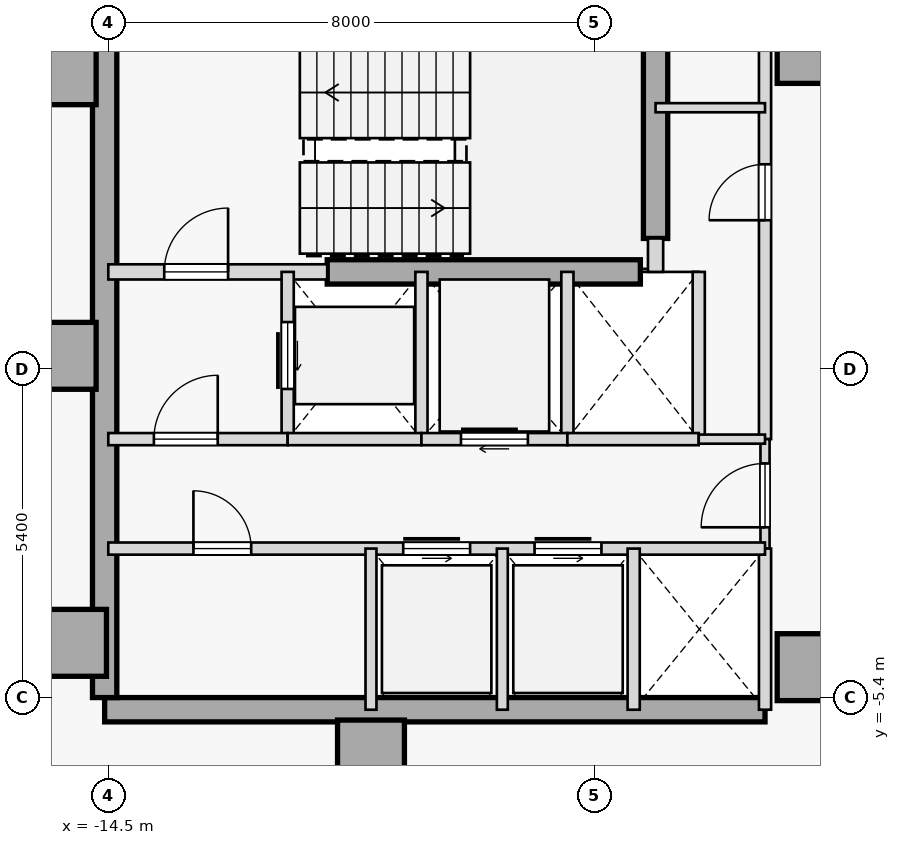
"""IFC4 building model, lengths in metres.
Left out: names, types, materials, properties, quantities, classifications, styles, units other than length and angle.
Written with IfcOpenShell. Run it as: python <this file> out.ifc"""

import sys

from ifc_helpers import new_model, si_unit, direction, frame, frame_2d, origin, origin_2d, place, context, subcontext, project, spatial, rectangle, extrude, element, fill, save


model = new_model("IFC4")
c1 = context("Model", 3, precision=1e-05, world=origin(), true_north=direction((0.0, 1.0)))
c2 = subcontext(c1, "Body", "Model", "MODEL_VIEW")
j1 = project(units=[si_unit("LENGTHUNIT", "METRE"), si_unit("PLANEANGLEUNIT", "RADIAN")], contexts=[c1])
p1 = place(None, origin())
s1 = spatial("IfcSite", under=j1, at=p1, CompositionType="ELEMENT")
p2 = place(p1, origin())
s2 = spatial("IfcBuilding", under=s1, at=p2, CompositionType="ELEMENT")
p3 = place(p2, frame((0.0, 0.0, 105.9)))
s3 = spatial("IfcBuildingStorey", under=s2, at=p3, CompositionType="ELEMENT", Elevation=105.9)
for number, where, z_axis, x_axis in (
    (1, (-15.25, 4.9, 0.0), (0.0, 0.0, 1.0), (1.0, 0.0, 0.0)),
    (2, (-15.25, 0.22, 0.0), (0.0, 0.0, 1.0), (1.0, 0.0, 0.0)),
    (3, (-15.08, -4.5, 0.0), (0.0, 0.0, 1.0), (1.0, 0.0, 0.0)),
    (4, (-10.18, -6.32, 0.0), (0.0, 0.0, 1.0), (1.0, 0.0, 0.0)),
    (5, (-2.95, -4.9, 0.0), (0.0, 0.0, 1.0), (1.0, 0.0, 0.0)),
    (6, (-2.95, 5.25, 0.0), (0.0, 0.0, 1.0), (1.0, 0.0, 0.0)),
):
    element("IfcColumn", number, at=place(p3, frame(where, z_axis=z_axis, x_axis=x_axis)), inside=s3, PredefinedType="COLUMN", context=c2, shape_type="SweptSolid", body=[
        extrude(rectangle(XDim=1.1, YDim=1.1, at=origin_2d()), origin(), (0.0, 0.0, 1.0), 3.7),
    ])
p4 = place(p3, frame((-14.56, -5.6, 0.0), z_axis=(0.0, 0.0, 1.0), x_axis=(1.0, 0.0, 0.0)))
e7 = element("IfcWall", 7, at=p4, inside=s3, PredefinedType="SHEAR", context=c2, shape_type="SweptSolid", body=[
    extrude(rectangle(XDim=10.86, YDim=0.4, at=frame_2d((5.43, 0.0))), origin(), (0.0, 0.0, 1.0), 3.475),
])
p5 = place(p3, frame((-14.56, -5.4, 0.0), z_axis=(0.0, 0.0, 1.0), x_axis=(0.0, 1.0, 0.0)))
e8 = element("IfcWall", 8, at=p5, inside=s3, PredefinedType="SHEAR", context=c2, shape_type="SweptSolid", body=[
    extrude(rectangle(XDim=10.8, YDim=0.4, at=frame_2d((5.4, 0.0))), origin(), (0.0, 0.0, 1.0), 3.475),
])
p6 = place(p3, frame((-5.5, 2.15, 0.0), z_axis=(0.0, 0.0, 1.0), x_axis=(0.0, 1.0, 0.0)))
e9 = element("IfcWall", 9, at=p6, inside=s3, PredefinedType="SHEAR", context=c2, shape_type="SweptSolid", body=[
    extrude(rectangle(XDim=3.25, YDim=0.4, at=frame_2d((1.625, 0.0))), origin(), (0.0, 0.0, 1.0), 3.475),
])
p7 = place(p3, frame((-10.9, 1.6, 0.0), z_axis=(0.0, 0.0, 1.0), x_axis=(1.0, 0.0, 0.0)))
e10 = element("IfcWall", 10, at=p7, inside=s3, PredefinedType="SHEAR", context=c2, shape_type="SweptSolid", body=[
    extrude(rectangle(XDim=5.15, YDim=0.4, at=frame_2d((2.575, 0.0))), origin(), (0.0, 0.0, 1.0), 3.475),
])
p8 = place(p3, frame((-14.5, 1.6, 0.0), z_axis=(0.0, 0.0, 1.0), x_axis=(1.0, 0.0, 0.0)))
e11 = element("IfcWall", 11, at=p8, inside=s3, PredefinedType="STANDARD", context=c2, shape_type="SweptSolid", body=[
    extrude(rectangle(XDim=3.6, YDim=0.25, at=frame_2d((1.8, 0.0))), origin(), (0.0, 0.0, 1.0), 3.475),
])
p9 = place(p8, frame((0.92, 0.0, 0.0)))
e12 = element("IfcOpeningElement", 12, at=p9, cuts=e11, PredefinedType="OPENING", context=c2, shape_type="SweptSolid", body=[
    extrude(rectangle(XDim=1.05, YDim=2.15, at=frame_2d((0.525, 1.075))), frame((0.0, 0.135, 0.0), z_axis=(0.0, -1.0, 0.0), x_axis=(1.0, 0.0, 0.0)), (0.0, 0.0, 1.0), 0.27),
])
p10 = place(p3, frame((-5.5, 1.6, 0.0), z_axis=(0.0, 0.0, 1.0), x_axis=(0.0, 1.0, 0.0)))
e13 = element("IfcWall", 13, at=p10, inside=s3, PredefinedType="STANDARD", context=c2, shape_type="SweptSolid", body=[
    extrude(rectangle(XDim=0.55, YDim=0.25, at=frame_2d((0.275, 0.0))), origin(), (0.0, 0.0, 1.0), 3.475),
])
p11 = place(p3, frame((-3.7, -1.15, 0.0), z_axis=(0.0, 0.0, 1.0), x_axis=(0.0, 1.0, 0.0)))
e14 = element("IfcWall", 14, at=p11, inside=s3, PredefinedType="STANDARD", context=c2, shape_type="SweptSolid", body=[
    extrude(rectangle(XDim=6.75, YDim=0.2, at=frame_2d((3.375, 0.0))), origin(), (0.0, 0.0, 1.0), 3.475),
])
p12 = place(p11, frame((3.6, 0.0, 0.0)))
e15 = element("IfcOpeningElement", 15, at=p12, cuts=e14, PredefinedType="OPENING", context=c2, shape_type="SweptSolid", body=[
    extrude(rectangle(XDim=0.92, YDim=2.15, at=frame_2d((0.46, 1.075))), frame((0.0, 0.11, 0.0), z_axis=(0.0, -1.0, 0.0), x_axis=(1.0, 0.0, 0.0)), (0.0, 0.0, 1.0), 0.22),
])
p13 = place(p3, frame((-3.7, -2.95, 0.0), z_axis=(0.0, 0.0, 1.0), x_axis=(0.0, 1.0, 0.0)))
e16 = element("IfcWall", 16, at=p13, inside=s3, PredefinedType="PARTITIONING", context=c2, shape_type="SweptSolid", body=[
    extrude(rectangle(XDim=1.8, YDim=0.15, at=frame_2d((0.9, 0.0))), origin(), (0.0, 0.0, 1.0), 3.475),
])
p14 = place(p13, frame((0.35, 0.0, 0.0)))
e17 = element("IfcOpeningElement", 17, at=p14, cuts=e16, PredefinedType="OPENING", context=c2, shape_type="SweptSolid", body=[
    extrude(rectangle(XDim=1.05, YDim=2.18, at=frame_2d((0.525, 1.09))), frame((0.0, 0.085, 0.0), z_axis=(0.0, -1.0, 0.0), x_axis=(1.0, 0.0, 0.0)), (0.0, 0.0, 1.0), 0.17),
])
p15 = place(p3, frame((-3.7, -5.6, 0.0), z_axis=(0.0, 0.0, 1.0), x_axis=(0.0, 1.0, 0.0)))
e18 = element("IfcWall", 18, at=p15, inside=s3, PredefinedType="STANDARD", context=c2, shape_type="SweptSolid", body=[
    extrude(rectangle(XDim=2.65, YDim=0.2, at=frame_2d((1.325, 0.0))), origin(), (0.0, 0.0, 1.0), 3.475),
])
p16 = place(p3, frame((-11.55, -1.15, 0.0), z_axis=(0.0, 0.0, 1.0), x_axis=(0.0, 1.0, 0.0)))
e19 = element("IfcWall", 19, at=p16, inside=s3, PredefinedType="STANDARD", context=c2, shape_type="SweptSolid", body=[
    extrude(rectangle(XDim=2.75, YDim=0.2, at=frame_2d((1.375, 0.0))), origin(), (0.0, 0.0, 1.0), 3.475),
])
p17 = place(p16, frame((0.825, 0.0, 0.0)))
e20 = element("IfcOpeningElement", 20, at=p17, cuts=e19, PredefinedType="OPENING", context=c2, shape_type="SweptSolid", body=[
    extrude(rectangle(XDim=1.1, YDim=2.15, at=frame_2d((0.55, 1.075))), frame((0.0, 0.11, 0.0), z_axis=(0.0, -1.0, 0.0), x_axis=(1.0, 0.0, 0.0)), (0.0, 0.0, 1.0), 0.22),
])
p18 = place(p3, frame((-9.35, -1.15, 0.0), z_axis=(0.0, 0.0, 1.0), x_axis=(0.0, 1.0, 0.0)))
e21 = element("IfcWall", 21, at=p18, inside=s3, PredefinedType="STANDARD", context=c2, shape_type="SweptSolid", body=[
    extrude(rectangle(XDim=2.75, YDim=0.2, at=frame_2d((1.375, 0.0))), origin(), (0.0, 0.0, 1.0), 3.475),
])
p19 = place(p3, frame((-14.5, -1.15, 0.0), z_axis=(0.0, 0.0, 1.0), x_axis=(1.0, 0.0, 0.0)))
e22 = element("IfcWall", 22, at=p19, inside=s3, PredefinedType="STANDARD", context=c2, shape_type="SweptSolid", body=[
    extrude(rectangle(XDim=2.95, YDim=0.2, at=frame_2d((1.475, 0.0))), origin(), (0.0, 0.0, 1.0), 3.475),
])
p20 = place(p19, frame((0.75, 0.0, 0.0)))
e23 = element("IfcOpeningElement", 23, at=p20, cuts=e22, PredefinedType="OPENING", context=c2, shape_type="SweptSolid", body=[
    extrude(rectangle(XDim=1.05, YDim=2.18, at=frame_2d((0.525, 1.09))), frame((0.0, 0.11, 0.0), z_axis=(0.0, -1.0, 0.0), x_axis=(1.0, 0.0, 0.0)), (0.0, 0.0, 1.0), 0.22),
])
p21 = place(p3, frame((-11.55, -1.15, 0.0), z_axis=(0.0, 0.0, 1.0), x_axis=(1.0, 0.0, 0.0)))
e24 = element("IfcWall", 24, at=p21, inside=s3, PredefinedType="STANDARD", context=c2, shape_type="SweptSolid", body=[
    extrude(rectangle(XDim=2.2, YDim=0.2, at=frame_2d((1.1, 0.0))), origin(), (0.0, 0.0, 1.0), 3.475),
])
p22 = place(p3, frame((-6.95, -1.15, 0.0), z_axis=(0.0, 0.0, 1.0), x_axis=(0.0, 1.0, 0.0)))
e25 = element("IfcWall", 25, at=p22, inside=s3, PredefinedType="STANDARD", context=c2, shape_type="SweptSolid", body=[
    extrude(rectangle(XDim=2.75, YDim=0.2, at=frame_2d((1.375, 0.0))), origin(), (0.0, 0.0, 1.0), 3.475),
])
p23 = place(p3, frame((-9.35, -1.15, 0.0), z_axis=(0.0, 0.0, 1.0), x_axis=(1.0, 0.0, 0.0)))
e26 = element("IfcWall", 26, at=p23, inside=s3, PredefinedType="STANDARD", context=c2, shape_type="SweptSolid", body=[
    extrude(rectangle(XDim=2.4, YDim=0.2, at=frame_2d((1.2, 0.0))), origin(), (0.0, 0.0, 1.0), 3.475),
])
p24 = place(p23, frame((0.65, 0.0, 0.0)))
e27 = element("IfcOpeningElement", 27, at=p24, cuts=e26, PredefinedType="OPENING", context=c2, shape_type="SweptSolid", body=[
    extrude(rectangle(XDim=1.1, YDim=2.15, at=frame_2d((0.55, 1.075))), frame((0.0, 0.11, 0.0), z_axis=(0.0, -1.0, 0.0), x_axis=(1.0, 0.0, 0.0)), (0.0, 0.0, 1.0), 0.22),
])
p25 = place(p3, frame((-4.79, -1.15, 0.0), z_axis=(0.0, 0.0, 1.0), x_axis=(0.0, 1.0, 0.0)))
e28 = element("IfcWall", 28, at=p25, inside=s3, PredefinedType="STANDARD", context=c2, shape_type="SweptSolid", body=[
    extrude(rectangle(XDim=2.75, YDim=0.2, at=frame_2d((1.375, 0.0))), origin(), (0.0, 0.0, 1.0), 3.475),
])
p26 = place(p3, frame((-6.95, -1.15, 0.0), z_axis=(0.0, 0.0, 1.0), x_axis=(1.0, 0.0, 0.0)))
e29 = element("IfcWall", 29, at=p26, inside=s3, PredefinedType="STANDARD", context=c2, shape_type="SweptSolid", body=[
    extrude(rectangle(XDim=2.16, YDim=0.2, at=frame_2d((1.08, 0.0))), origin(), (0.0, 0.0, 1.0), 3.475),
])
p27 = place(p3, frame((-4.79, -1.15, 0.0), z_axis=(0.0, 0.0, 1.0), x_axis=(1.0, 0.0, 0.0)))
e30 = element("IfcWall", 30, at=p27, inside=s3, PredefinedType="PARTITIONING", context=c2, shape_type="SweptSolid", body=[
    extrude(rectangle(XDim=1.09, YDim=0.15, at=frame_2d((0.545, 0.0))), origin(), (0.0, 0.0, 1.0), 3.475),
])
p28 = place(p3, frame((-14.5, -2.95, 0.0), z_axis=(0.0, 0.0, 1.0), x_axis=(1.0, 0.0, 0.0)))
e31 = element("IfcWall", 31, at=p28, inside=s3, PredefinedType="STANDARD", context=c2, shape_type="SweptSolid", body=[
    extrude(rectangle(XDim=10.8, YDim=0.2, at=frame_2d((5.4, 0.0))), origin(), (0.0, 0.0, 1.0), 3.475),
])
p29 = place(p28, frame((4.85, 0.0, 0.0)))
e32 = element("IfcOpeningElement", 32, at=p29, cuts=e31, PredefinedType="OPENING", context=c2, shape_type="SweptSolid", body=[
    extrude(rectangle(XDim=1.1, YDim=2.15, at=frame_2d((0.55, 1.075))), frame((0.0, 0.11, 0.0), z_axis=(0.0, -1.0, 0.0), x_axis=(1.0, 0.0, 0.0)), (0.0, 0.0, 1.0), 0.22),
])
p30 = place(p28, frame((7.01, 0.0, 0.0)))
e33 = element("IfcOpeningElement", 33, at=p30, cuts=e31, PredefinedType="OPENING", context=c2, shape_type="SweptSolid", body=[
    extrude(rectangle(XDim=1.1, YDim=2.15, at=frame_2d((0.55, 1.075))), frame((0.0, 0.11, 0.0), z_axis=(0.0, -1.0, 0.0), x_axis=(1.0, 0.0, 0.0)), (0.0, 0.0, 1.0), 0.22),
])
p31 = place(p28, frame((1.4, 0.0, 0.0)))
e34 = element("IfcOpeningElement", 34, at=p31, cuts=e31, PredefinedType="OPENING", context=c2, shape_type="SweptSolid", body=[
    extrude(rectangle(XDim=0.95, YDim=2.15, at=frame_2d((0.475, 1.075))), frame((0.0, 0.11, 0.0), z_axis=(0.0, -1.0, 0.0), x_axis=(1.0, 0.0, 0.0)), (0.0, 0.0, 1.0), 0.22),
])
p32 = place(p3, frame((-5.86, -5.6, 0.0), z_axis=(0.0, 0.0, 1.0), x_axis=(0.0, 1.0, 0.0)))
e35 = element("IfcWall", 35, at=p32, inside=s3, PredefinedType="STANDARD", context=c2, shape_type="SweptSolid", body=[
    extrude(rectangle(XDim=2.65, YDim=0.2, at=frame_2d((1.325, 0.0))), origin(), (0.0, 0.0, 1.0), 3.475),
])
for number, where, z_axis, x_axis in (
    (36, (-10.18, -5.6, 0.0), (0.0, 0.0, 1.0), (0.0, 1.0, 0.0)),
    (37, (-8.02, -5.6, 0.0), (0.0, 0.0, 1.0), (0.0, 1.0, 0.0)),
):
    element("IfcWall", number, at=place(p3, frame(where, z_axis=z_axis, x_axis=x_axis)), inside=s3, PredefinedType="STANDARD", context=c2, shape_type="SweptSolid", body=[
        extrude(rectangle(XDim=2.65, YDim=0.18, at=frame_2d((1.325, 0.0))), origin(), (0.0, 0.0, 1.0), 3.475),
    ])
p33 = place(p3, frame((-5.5, 4.3, 0.0), z_axis=(0.0, 0.0, 1.0), x_axis=(1.0, 0.0, 0.0)))
e38 = element("IfcWall", 38, at=p33, inside=s3, PredefinedType="PARTITIONING", context=c2, shape_type="SweptSolid", body=[
    extrude(rectangle(XDim=1.8, YDim=0.15, at=frame_2d((0.9, 0.0))), origin(), (0.0, 0.0, 1.0), 3.475),
])
p34 = place(p9, origin())
e39 = element("IfcDoor", 39, at=p34, inside=s3, OperationType="SINGLE_SWING_RIGHT", PredefinedType="DOOR", context=c2, shape_type="SweptSolid", body=[
    extrude(rectangle(XDim=1.05, YDim=2.15, at=frame_2d((0.525, 1.075))), frame((0.0, 0.025, 0.0), z_axis=(0.0, -1.0, 0.0), x_axis=(1.0, 0.0, 0.0)), (0.0, 0.0, 1.0), 0.05),
])
fill(e12, e39)
p35 = place(p20, origin())
e40 = element("IfcDoor", 40, at=p35, inside=s3, OperationType="SINGLE_SWING_RIGHT", PredefinedType="DOOR", context=c2, shape_type="SweptSolid", body=[
    extrude(rectangle(XDim=1.05, YDim=2.18, at=frame_2d((0.525, 1.09))), frame((0.0, 0.025, 0.0), z_axis=(0.0, -1.0, 0.0), x_axis=(1.0, 0.0, 0.0)), (0.0, 0.0, 1.0), 0.05),
])
fill(e23, e40)
p36 = place(p14, origin())
e41 = element("IfcDoor", 41, at=p36, inside=s3, OperationType="SINGLE_SWING_LEFT", PredefinedType="DOOR", context=c2, shape_type="SweptSolid", body=[
    extrude(rectangle(XDim=1.05, YDim=2.18, at=frame_2d((0.525, 1.09))), frame((0.0, 0.025, 0.0), z_axis=(0.0, -1.0, 0.0), x_axis=(1.0, 0.0, 0.0)), (0.0, 0.0, 1.0), 0.05),
])
fill(e17, e41)
p37 = place(p17, origin())
e42 = element("IfcDoor", 42, at=p37, inside=s3, OperationType="SLIDING_TO_RIGHT", PredefinedType="DOOR", context=c2, shape_type="SweptSolid", body=[
    extrude(rectangle(XDim=1.1, YDim=2.15, at=frame_2d((0.55, 1.075))), frame((0.0, 0.025, 0.0), z_axis=(0.0, -1.0, 0.0), x_axis=(1.0, 0.0, 0.0)), (0.0, 0.0, 1.0), 0.05),
])
fill(e20, e42)
p38 = place(p24, origin())
e43 = element("IfcDoor", 43, at=p38, inside=s3, OperationType="SLIDING_TO_RIGHT", PredefinedType="DOOR", context=c2, shape_type="SweptSolid", body=[
    extrude(rectangle(XDim=1.1, YDim=2.15, at=frame_2d((0.55, 1.075))), frame((0.0, 0.025, 0.0), z_axis=(0.0, -1.0, 0.0), x_axis=(1.0, 0.0, 0.0)), (0.0, 0.0, 1.0), 0.05),
])
fill(e27, e43)
p39 = place(p29, origin())
e44 = element("IfcDoor", 44, at=p39, inside=s3, OperationType="SLIDING_TO_LEFT", PredefinedType="DOOR", context=c2, shape_type="SweptSolid", body=[
    extrude(rectangle(XDim=1.1, YDim=2.15, at=frame_2d((0.55, 1.075))), frame((0.0, 0.025, 0.0), z_axis=(0.0, -1.0, 0.0), x_axis=(1.0, 0.0, 0.0)), (0.0, 0.0, 1.0), 0.05),
])
fill(e32, e44)
p40 = place(p30, origin())
e45 = element("IfcDoor", 45, at=p40, inside=s3, OperationType="SLIDING_TO_LEFT", PredefinedType="DOOR", context=c2, shape_type="SweptSolid", body=[
    extrude(rectangle(XDim=1.1, YDim=2.15, at=frame_2d((0.55, 1.075))), frame((0.0, 0.025, 0.0), z_axis=(0.0, -1.0, 0.0), x_axis=(1.0, 0.0, 0.0)), (0.0, 0.0, 1.0), 0.05),
])
fill(e33, e45)
p41 = place(p31, origin())
e46 = element("IfcDoor", 46, at=p41, inside=s3, OperationType="SINGLE_SWING_LEFT", PredefinedType="DOOR", context=c2, shape_type="SweptSolid", body=[
    extrude(rectangle(XDim=0.95, YDim=2.15, at=frame_2d((0.475, 1.075))), frame((0.0, 0.025, 0.0), z_axis=(0.0, -1.0, 0.0), x_axis=(1.0, 0.0, 0.0)), (0.0, 0.0, 1.0), 0.05),
])
fill(e34, e46)
p42 = place(p12, origin())
e47 = element("IfcDoor", 47, at=p42, inside=s3, OperationType="SINGLE_SWING_LEFT", PredefinedType="DOOR", context=c2, shape_type="SweptSolid", body=[
    extrude(rectangle(XDim=0.92, YDim=2.15, at=frame_2d((0.46, 1.075))), frame((0.0, 0.025, 0.0), z_axis=(0.0, -1.0, 0.0), x_axis=(1.0, 0.0, 0.0)), (0.0, 0.0, 1.0), 0.05),
])
fill(e15, e47)
save(model, sys.argv[1])
